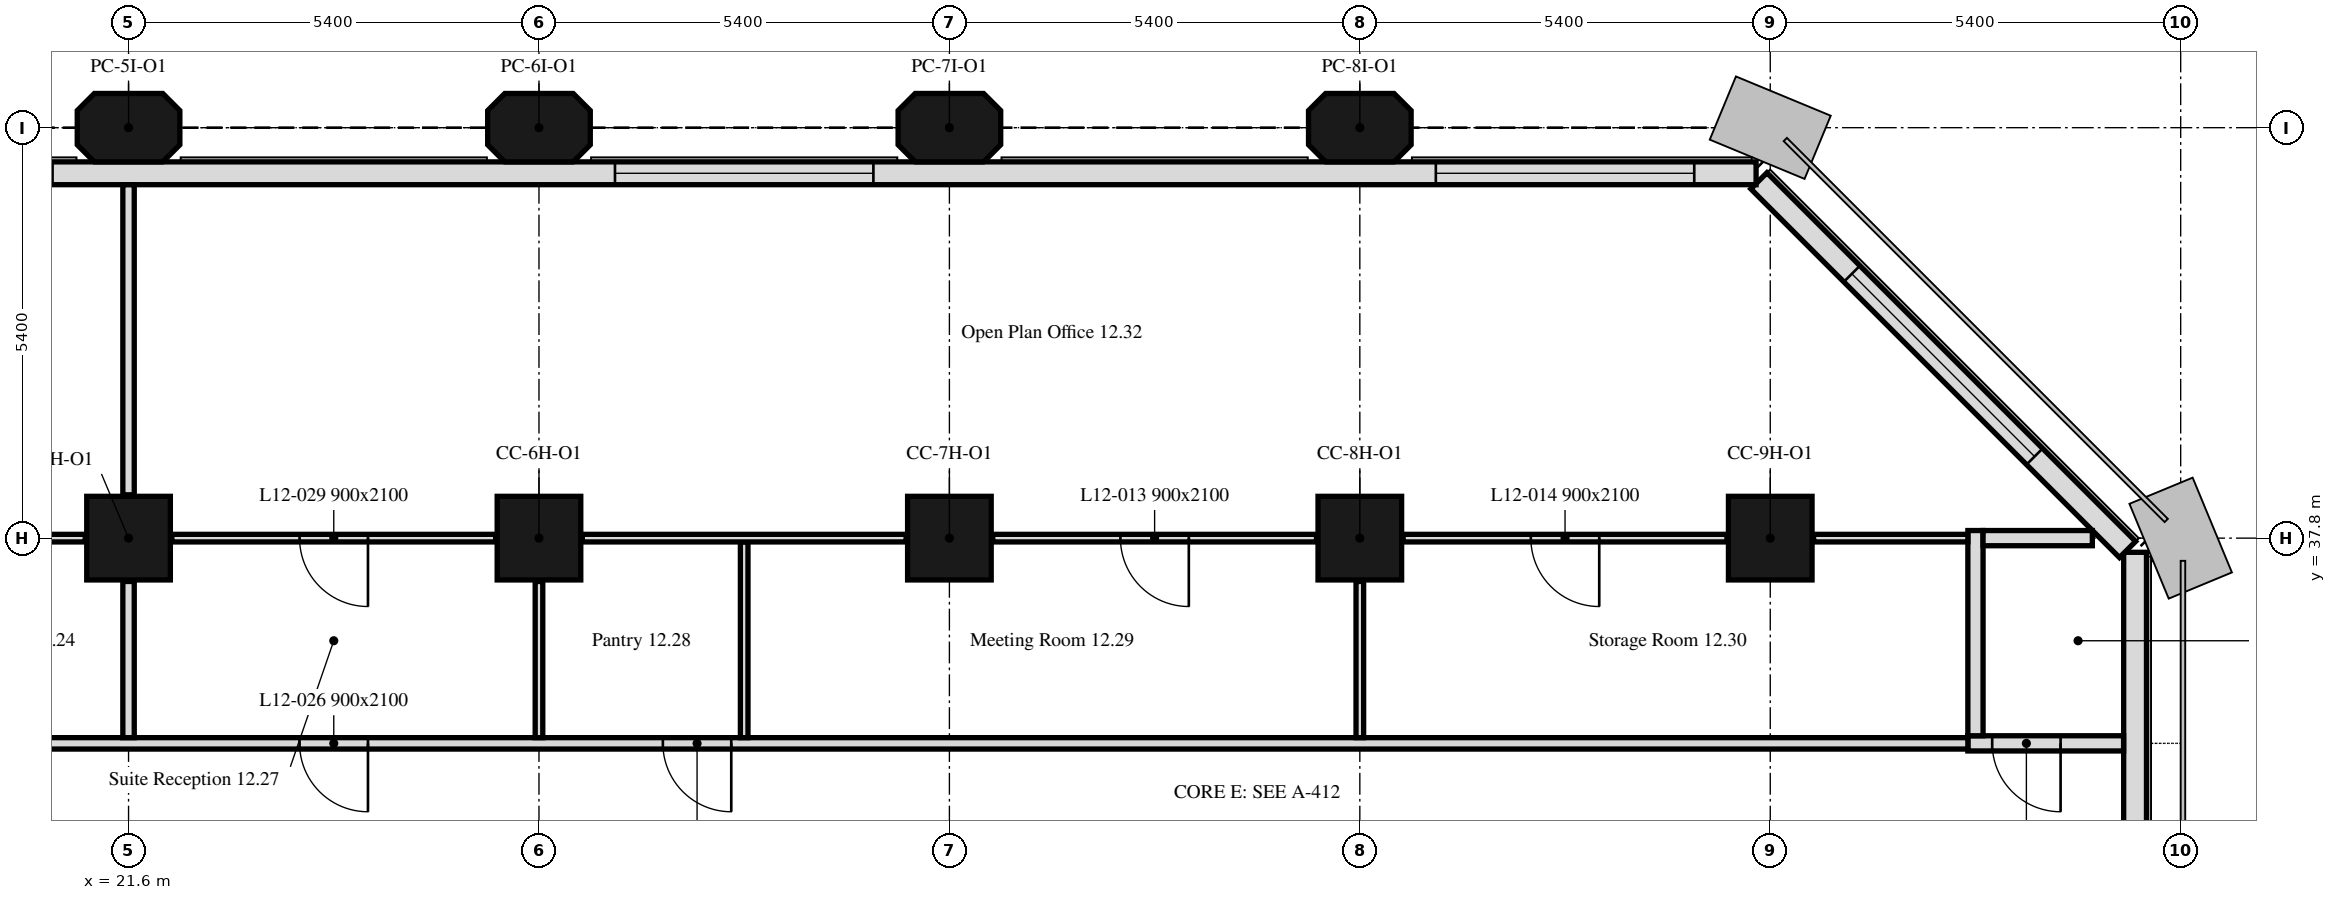
"""IFC4 building model, lengths in metres.
Left out: names, types, materials, properties, quantities, classifications, styles, units other than length and angle.
Written with IfcOpenShell. Run it as: python <this file> out.ifc"""

import sys

from ifc_helpers import new_model, si_unit, direction, frame, frame_2d, origin, origin_2d, place, context, subcontext, project, spatial, polyline, rectangle, outline, extrude, element, fill, save


model = new_model("IFC4")
c1 = context("Model", 3, precision=1e-05, world=origin(), true_north=direction((0.0, 1.0)))
c2 = subcontext(c1, "Body", "Model", "MODEL_VIEW")
j1 = project(units=[si_unit("LENGTHUNIT", "METRE"), si_unit("PLANEANGLEUNIT", "RADIAN")], contexts=[c1])
p1 = place(None, origin())
s1 = spatial("IfcSite", under=j1, at=p1, CompositionType="ELEMENT")
p2 = place(p1, origin())
s2 = spatial("IfcBuilding", under=s1, at=p2, CompositionType="ELEMENT")
p3 = place(p2, frame((0.0, 0.0, 56.4)))
s3 = spatial("IfcBuildingStorey", under=s2, at=p3, CompositionType="ELEMENT", Elevation=56.4)
for number, where, z_axis, x_axis in (
    (1, (21.6, 37.8, 0.0), (0.0, 0.0, 1.0), (1.0, 0.0, 0.0)),
    (2, (27.0, 37.8, 0.0), (0.0, 0.0, 1.0), (1.0, 0.0, 0.0)),
    (3, (32.4, 37.8, 0.0), (0.0, 0.0, 1.0), (1.0, 0.0, 0.0)),
    (4, (37.8, 37.8, 0.0), (0.0, 0.0, 1.0), (1.0, 0.0, 0.0)),
    (5, (43.2, 37.8, 0.0), (0.0, 0.0, 1.0), (1.0, 0.0, 0.0)),
):
    element("IfcColumn", number, at=place(p3, frame(where, z_axis=z_axis, x_axis=x_axis)), inside=s3, PredefinedType="COLUMN", context=c2, shape_type="SweptSolid", body=[
        extrude(rectangle(XDim=1.1, YDim=1.1, at=origin_2d()), origin(), (0.0, 0.0, 1.0), 3.3),
    ])
for number, where, z_axis, x_axis in (
    (6, (21.6, 43.2, 0.0), (0.0, 0.0, 1.0), (1.0, 0.0, 0.0)),
    (7, (27.0, 43.2, 0.0), (0.0, 0.0, 1.0), (1.0, 0.0, 0.0)),
    (8, (32.4, 43.2, 0.0), (0.0, 0.0, 1.0), (1.0, 0.0, 0.0)),
    (9, (37.8, 43.2, 0.0), (0.0, 0.0, 1.0), (1.0, 0.0, 0.0)),
):
    element("IfcColumn", number, at=place(p3, frame(where, z_axis=z_axis, x_axis=x_axis)), inside=s3, PredefinedType="COLUMN", context=c2, shape_type="SweptSolid", body=[
        extrude(outline(polyline([(-0.45, -0.45), (0.45, -0.45), (0.675, -0.225), (0.675, 0.225), (0.45, 0.45), (-0.45, 0.45), (-0.675, 0.225), (-0.675, -0.225), (-0.45, -0.45)])), origin(), (0.0, 0.0, 1.0), 3.3),
    ])
p4 = place(p3, frame((48.0, 5.586, 0.0), z_axis=(0.0, 0.0, 1.0), x_axis=(0.0, 1.0, 0.0)))
e10 = element("IfcWall", 10, at=p4, inside=s3, PredefinedType="SOLIDWALL", context=c2, shape_type="SweptSolid", body=[
    extrude(rectangle(XDim=32.027, YDim=0.3, at=frame_2d((16.014, 0.0))), origin(), (0.0, 0.0, 1.0), 3.3),
])
p5 = place(p4, frame((0.814, 0.0, 0.9)))
e11 = element("IfcOpeningElement", 11, at=p5, cuts=e10, PredefinedType="OPENING", context=c2, shape_type="SweptSolid", body=[
    extrude(rectangle(XDim=3.4, YDim=1.7, at=frame_2d((1.7, 0.85))), frame((0.0, 0.16, 0.0), z_axis=(0.0, -1.0, 0.0), x_axis=(1.0, 0.0, 0.0)), (0.0, 0.0, 1.0), 0.32),
])
p6 = place(p4, frame((11.614, 0.0, 0.9)))
e12 = element("IfcOpeningElement", 12, at=p6, cuts=e10, PredefinedType="OPENING", context=c2, shape_type="SweptSolid", body=[
    extrude(rectangle(XDim=3.4, YDim=1.7, at=frame_2d((1.7, 0.85))), frame((0.0, 0.16, 0.0), z_axis=(0.0, -1.0, 0.0), x_axis=(1.0, 0.0, 0.0)), (0.0, 0.0, 1.0), 0.32),
])
p7 = place(p4, frame((22.414, 0.0, 0.9)))
e13 = element("IfcOpeningElement", 13, at=p7, cuts=e10, PredefinedType="OPENING", context=c2, shape_type="SweptSolid", body=[
    extrude(rectangle(XDim=3.4, YDim=1.7, at=frame_2d((1.7, 0.85))), frame((0.0, 0.16, 0.0), z_axis=(0.0, -1.0, 0.0), x_axis=(1.0, 0.0, 0.0)), (0.0, 0.0, 1.0), 0.32),
])
p8 = place(p3, frame((47.901, 37.65, 0.0), z_axis=(0.0, 0.0, 1.0), x_axis=(-0.707106781187, 0.707106781187, 0.0)))
e14 = element("IfcWall", 14, at=p8, inside=s3, PredefinedType="SOLIDWALL", context=c2, shape_type="SweptSolid", body=[
    extrude(rectangle(XDim=6.86, YDim=0.3, at=frame_2d((3.43, 0.0))), origin(), (0.0, 0.0, 1.0), 3.3),
])
p9 = place(p8, frame((1.73, 0.0, 0.9)))
e15 = element("IfcOpeningElement", 15, at=p9, cuts=e14, PredefinedType="OPENING", context=c2, shape_type="SweptSolid", body=[
    extrude(rectangle(XDim=3.4, YDim=1.7, at=frame_2d((1.7, 0.85))), frame((0.0, 0.16, 0.0), z_axis=(0.0, -1.0, 0.0), x_axis=(1.0, 0.0, 0.0)), (0.0, 0.0, 1.0), 0.32),
])
p10 = place(p3, frame((43.014, 42.6, 0.0), z_axis=(0.0, 0.0, 1.0), x_axis=(-1.0, 0.0, 0.0)))
e16 = element("IfcWall", 16, at=p10, inside=s3, PredefinedType="SOLIDWALL", context=c2, shape_type="SweptSolid", body=[
    extrude(rectangle(XDim=32.027, YDim=0.3, at=frame_2d((16.014, 0.0))), origin(), (0.0, 0.0, 1.0), 3.3),
])
p11 = place(p10, frame((0.814, 0.0, 0.9)))
e17 = element("IfcOpeningElement", 17, at=p11, cuts=e16, PredefinedType="OPENING", context=c2, shape_type="SweptSolid", body=[
    extrude(rectangle(XDim=3.4, YDim=1.7, at=frame_2d((1.7, 0.85))), frame((0.0, 0.16, 0.0), z_axis=(0.0, -1.0, 0.0), x_axis=(1.0, 0.0, 0.0)), (0.0, 0.0, 1.0), 0.32),
])
p12 = place(p10, frame((11.614, 0.0, 0.9)))
e18 = element("IfcOpeningElement", 18, at=p12, cuts=e16, PredefinedType="OPENING", context=c2, shape_type="SweptSolid", body=[
    extrude(rectangle(XDim=3.4, YDim=1.7, at=frame_2d((1.7, 0.85))), frame((0.0, 0.16, 0.0), z_axis=(0.0, -1.0, 0.0), x_axis=(1.0, 0.0, 0.0)), (0.0, 0.0, 1.0), 0.32),
])
p13 = place(p10, frame((22.414, 0.0, 0.9)))
e19 = element("IfcOpeningElement", 19, at=p13, cuts=e16, PredefinedType="OPENING", context=c2, shape_type="SweptSolid", body=[
    extrude(rectangle(XDim=3.4, YDim=1.7, at=frame_2d((1.7, 0.85))), frame((0.0, 0.16, 0.0), z_axis=(0.0, -1.0, 0.0), x_axis=(1.0, 0.0, 0.0)), (0.0, 0.0, 1.0), 0.32),
])
p14 = place(p3, frame((47.849, 35.1, 0.0), z_axis=(0.0, 0.0, 1.0), x_axis=(-1.0, 0.0, 0.0)))
e20 = element("IfcWall", 20, at=p14, inside=s3, PredefinedType="PARTITIONING", context=c2, shape_type="SweptSolid", body=[
    extrude(rectangle(XDim=2.049, YDim=0.2, at=frame_2d((1.024, 0.0))), origin(), (0.0, 0.0, 1.0), 3.3),
])
p15 = place(p14, frame((0.829, 0.0, 0.0)))
e21 = element("IfcOpeningElement", 21, at=p15, cuts=e20, PredefinedType="OPENING", context=c2, shape_type="SweptSolid", body=[
    extrude(rectangle(XDim=0.9, YDim=2.1, at=frame_2d((0.45, 1.05))), frame((0.0, 0.1, 0.0), z_axis=(0.0, -1.0, 0.0), x_axis=(1.0, 0.0, 0.0)), (0.0, 0.0, 1.0), 0.2),
])
p16 = place(p3, frame((45.8, 35.1, 0.0), z_axis=(0.0, 0.0, 1.0), x_axis=(-1.0, 0.0, 0.0)))
e22 = element("IfcWall", 22, at=p16, inside=s3, PredefinedType="PARTITIONING", context=c2, shape_type="SweptSolid", body=[
    extrude(rectangle(XDim=39.649, YDim=0.15, at=frame_2d((19.825, 0.0))), origin(), (0.0, 0.0, 1.0), 3.3),
])
p17 = place(p16, frame((37.87, 0.0, 0.0)))
e23 = element("IfcOpeningElement", 23, at=p17, cuts=e22, PredefinedType="OPENING", context=c2, shape_type="SweptSolid", body=[
    extrude(rectangle(XDim=0.9, YDim=2.1, at=frame_2d((0.45, 1.05))), frame((0.0, 0.075, 0.0), z_axis=(0.0, -1.0, 0.0), x_axis=(1.0, 0.0, 0.0)), (0.0, 0.0, 1.0), 0.15),
])
p18 = place(p16, frame((36.575, 0.0, 0.0)))
e24 = element("IfcOpeningElement", 24, at=p18, cuts=e22, PredefinedType="OPENING", context=c2, shape_type="SweptSolid", body=[
    extrude(rectangle(XDim=0.9, YDim=2.1, at=frame_2d((0.45, 1.05))), frame((0.0, 0.075, 0.0), z_axis=(0.0, -1.0, 0.0), x_axis=(1.0, 0.0, 0.0)), (0.0, 0.0, 1.0), 0.15),
])
p19 = place(p16, frame((32.47, 0.0, 0.0)))
e25 = element("IfcOpeningElement", 25, at=p19, cuts=e22, PredefinedType="OPENING", context=c2, shape_type="SweptSolid", body=[
    extrude(rectangle(XDim=0.9, YDim=2.1, at=frame_2d((0.45, 1.05))), frame((0.0, 0.075, 0.0), z_axis=(0.0, -1.0, 0.0), x_axis=(1.0, 0.0, 0.0)), (0.0, 0.0, 1.0), 0.15),
])
p20 = place(p16, frame((16.27, 0.0, 0.0)))
e26 = element("IfcOpeningElement", 26, at=p20, cuts=e22, PredefinedType="OPENING", context=c2, shape_type="SweptSolid", body=[
    extrude(rectangle(XDim=0.9, YDim=2.1, at=frame_2d((0.45, 1.05))), frame((0.0, 0.075, 0.0), z_axis=(0.0, -1.0, 0.0), x_axis=(1.0, 0.0, 0.0)), (0.0, 0.0, 1.0), 0.15),
])
p21 = place(p16, frame((21.05, 0.0, 0.0)))
e27 = element("IfcOpeningElement", 27, at=p21, cuts=e22, PredefinedType="OPENING", context=c2, shape_type="SweptSolid", body=[
    extrude(rectangle(XDim=0.9, YDim=2.1, at=frame_2d((0.45, 1.05))), frame((0.0, 0.075, 0.0), z_axis=(0.0, -1.0, 0.0), x_axis=(1.0, 0.0, 0.0)), (0.0, 0.0, 1.0), 0.15),
])
p22 = place(p16, frame((31.23, 0.0, 0.0)))
e28 = element("IfcOpeningElement", 28, at=p22, cuts=e22, PredefinedType="OPENING", context=c2, shape_type="SweptSolid", body=[
    extrude(rectangle(XDim=0.9, YDim=2.1, at=frame_2d((0.45, 1.05))), frame((0.0, 0.075, 0.0), z_axis=(0.0, -1.0, 0.0), x_axis=(1.0, 0.0, 0.0)), (0.0, 0.0, 1.0), 0.15),
])
p23 = place(p3, frame((21.6, 35.175, 0.0), z_axis=(0.0, 0.0, 1.0), x_axis=(0.0, 1.0, 0.0)))
e29 = element("IfcWall", 29, at=p23, inside=s3, PredefinedType="PARTITIONING", context=c2, shape_type="SweptSolid", body=[
    extrude(rectangle(XDim=2.055, YDim=0.15, at=frame_2d((1.027, 0.0))), origin(), (0.0, 0.0, 1.0), 3.3),
])
p24 = place(p3, frame((21.03, 37.8, 0.0), z_axis=(0.0, 0.0, 1.0), x_axis=(-1.0, 0.0, 0.0)))
e30 = element("IfcWall", 30, at=p24, inside=s3, PredefinedType="PARTITIONING", context=c2, shape_type="SweptSolid", body=[
    extrude(rectangle(XDim=4.26, YDim=0.1, at=frame_2d((2.13, 0.0))), origin(), (0.0, 0.0, 1.0), 3.3),
])
p25 = place(p3, frame((21.6, 38.37, 0.0), z_axis=(0.0, 0.0, 1.0), x_axis=(0.0, 1.0, 0.0)))
e31 = element("IfcWall", 31, at=p25, inside=s3, PredefinedType="PARTITIONING", context=c2, shape_type="SweptSolid", body=[
    extrude(rectangle(XDim=4.079, YDim=0.15, at=frame_2d((2.04, 0.0))), origin(), (0.0, 0.0, 1.0), 3.3),
])
p26 = place(p3, frame((27.0, 35.175, 0.0), z_axis=(0.0, 0.0, 1.0), x_axis=(0.0, 1.0, 0.0)))
e32 = element("IfcWall", 32, at=p26, inside=s3, PredefinedType="PARTITIONING", context=c2, shape_type="SweptSolid", body=[
    extrude(rectangle(XDim=2.055, YDim=0.1, at=frame_2d((1.027, 0.0))), origin(), (0.0, 0.0, 1.0), 3.3),
])
p27 = place(p3, frame((26.43, 37.8, 0.0), z_axis=(0.0, 0.0, 1.0), x_axis=(-1.0, 0.0, 0.0)))
e33 = element("IfcWall", 33, at=p27, inside=s3, PredefinedType="PARTITIONING", context=c2, shape_type="SweptSolid", body=[
    extrude(rectangle(XDim=4.26, YDim=0.1, at=frame_2d((2.13, 0.0))), origin(), (0.0, 0.0, 1.0), 3.3),
])
p28 = place(p27, frame((1.68, 0.0, 0.0)))
e34 = element("IfcOpeningElement", 34, at=p28, cuts=e33, PredefinedType="OPENING", context=c2, shape_type="SweptSolid", body=[
    extrude(rectangle(XDim=0.9, YDim=2.1, at=frame_2d((0.45, 1.05))), frame((0.0, 0.05, 0.0), z_axis=(0.0, -1.0, 0.0), x_axis=(1.0, 0.0, 0.0)), (0.0, 0.0, 1.0), 0.1),
])
p29 = place(p3, frame((29.7, 35.175, 0.0), z_axis=(0.0, 0.0, 1.0), x_axis=(0.0, 1.0, 0.0)))
e35 = element("IfcWall", 35, at=p29, inside=s3, PredefinedType="PARTITIONING", context=c2, shape_type="SweptSolid", body=[
    extrude(rectangle(XDim=2.575, YDim=0.1, at=frame_2d((1.288, 0.0))), origin(), (0.0, 0.0, 1.0), 3.3),
])
p30 = place(p3, frame((37.8, 35.175, 0.0), z_axis=(0.0, 0.0, 1.0), x_axis=(0.0, 1.0, 0.0)))
e36 = element("IfcWall", 36, at=p30, inside=s3, PredefinedType="PARTITIONING", context=c2, shape_type="SweptSolid", body=[
    extrude(rectangle(XDim=2.055, YDim=0.1, at=frame_2d((1.027, 0.0))), origin(), (0.0, 0.0, 1.0), 3.3),
])
p31 = place(p3, frame((37.23, 37.8, 0.0), z_axis=(0.0, 0.0, 1.0), x_axis=(-1.0, 0.0, 0.0)))
e37 = element("IfcWall", 37, at=p31, inside=s3, PredefinedType="PARTITIONING", context=c2, shape_type="SweptSolid", body=[
    extrude(rectangle(XDim=4.26, YDim=0.1, at=frame_2d((2.13, 0.0))), origin(), (0.0, 0.0, 1.0), 3.3),
])
p32 = place(p31, frame((1.68, 0.0, 0.0)))
e38 = element("IfcOpeningElement", 38, at=p32, cuts=e37, PredefinedType="OPENING", context=c2, shape_type="SweptSolid", body=[
    extrude(rectangle(XDim=0.9, YDim=2.1, at=frame_2d((0.45, 1.05))), frame((0.0, 0.05, 0.0), z_axis=(0.0, -1.0, 0.0), x_axis=(1.0, 0.0, 0.0)), (0.0, 0.0, 1.0), 0.1),
])
p33 = place(p3, frame((31.83, 37.8, 0.0), z_axis=(0.0, 0.0, 1.0), x_axis=(-1.0, 0.0, 0.0)))
e39 = element("IfcWall", 39, at=p33, inside=s3, PredefinedType="PARTITIONING", context=c2, shape_type="SweptSolid", body=[
    extrude(rectangle(XDim=4.26, YDim=0.1, at=frame_2d((2.13, 0.0))), origin(), (0.0, 0.0, 1.0), 3.3),
])
p34 = place(p3, frame((45.9, 35.2, 0.0), z_axis=(0.0, 0.0, 1.0), x_axis=(0.0, 1.0, 0.0)))
e40 = element("IfcWall", 40, at=p34, inside=s3, PredefinedType="PARTITIONING", context=c2, shape_type="SweptSolid", body=[
    extrude(rectangle(XDim=2.7, YDim=0.2, at=frame_2d((1.35, 0.0))), origin(), (0.0, 0.0, 1.0), 3.3),
])
p35 = place(p3, frame((45.8, 37.8, 0.0), z_axis=(0.0, 0.0, 1.0), x_axis=(-1.0, 0.0, 0.0)))
e41 = element("IfcWall", 41, at=p35, inside=s3, PredefinedType="PARTITIONING", context=c2, shape_type="SweptSolid", body=[
    extrude(rectangle(XDim=2.03, YDim=0.1, at=frame_2d((1.015, 0.0))), origin(), (0.0, 0.0, 1.0), 3.3),
])
p36 = place(p3, frame((42.63, 37.8, 0.0), z_axis=(0.0, 0.0, 1.0), x_axis=(-1.0, 0.0, 0.0)))
e42 = element("IfcWall", 42, at=p36, inside=s3, PredefinedType="PARTITIONING", context=c2, shape_type="SweptSolid", body=[
    extrude(rectangle(XDim=4.26, YDim=0.1, at=frame_2d((2.13, 0.0))), origin(), (0.0, 0.0, 1.0), 3.3),
])
p37 = place(p36, frame((1.68, 0.0, 0.0)))
e43 = element("IfcOpeningElement", 43, at=p37, cuts=e42, PredefinedType="OPENING", context=c2, shape_type="SweptSolid", body=[
    extrude(rectangle(XDim=0.9, YDim=2.1, at=frame_2d((0.45, 1.05))), frame((0.0, 0.05, 0.0), z_axis=(0.0, -1.0, 0.0), x_axis=(1.0, 0.0, 0.0)), (0.0, 0.0, 1.0), 0.1),
])
p38 = place(p3, frame((47.438, 37.8, 0.0), z_axis=(0.0, 0.0, 1.0), x_axis=(-1.0, 0.0, 0.0)))
e44 = element("IfcWall", 44, at=p38, inside=s3, PredefinedType="PARTITIONING", context=c2, shape_type="SweptSolid", body=[
    extrude(rectangle(XDim=1.438, YDim=0.2, at=frame_2d((0.719, 0.0))), origin(), (0.0, 0.0, 1.0), 3.3),
])
p39 = place(p9, origin())
e45 = element("IfcWindow", 45, at=p39, inside=s3, PartitioningType="SINGLE_PANEL", PredefinedType="WINDOW", context=c2, shape_type="SweptSolid", body=[
    extrude(rectangle(XDim=3.4, YDim=1.7, at=frame_2d((1.7, 0.85))), frame((0.0, 0.03, 0.0), z_axis=(0.0, -1.0, 0.0), x_axis=(1.0, 0.0, 0.0)), (0.0, 0.0, 1.0), 0.06),
])
fill(e15, e45)
p40 = place(p11, origin())
e46 = element("IfcWindow", 46, at=p40, inside=s3, PartitioningType="SINGLE_PANEL", PredefinedType="WINDOW", context=c2, shape_type="SweptSolid", body=[
    extrude(rectangle(XDim=3.4, YDim=1.7, at=frame_2d((1.7, 0.85))), frame((0.0, 0.03, 0.0), z_axis=(0.0, -1.0, 0.0), x_axis=(1.0, 0.0, 0.0)), (0.0, 0.0, 1.0), 0.06),
])
fill(e17, e46)
p41 = place(p12, origin())
e47 = element("IfcWindow", 47, at=p41, inside=s3, PartitioningType="SINGLE_PANEL", PredefinedType="WINDOW", context=c2, shape_type="SweptSolid", body=[
    extrude(rectangle(XDim=3.4, YDim=1.7, at=frame_2d((1.7, 0.85))), frame((0.0, 0.03, 0.0), z_axis=(0.0, -1.0, 0.0), x_axis=(1.0, 0.0, 0.0)), (0.0, 0.0, 1.0), 0.06),
])
fill(e18, e47)
p42 = place(p20, origin())
e48 = element("IfcDoor", 48, at=p42, inside=s3, OperationType="SINGLE_SWING_LEFT", PredefinedType="DOOR", context=c2, shape_type="SweptSolid", body=[
    extrude(rectangle(XDim=0.9, YDim=2.1, at=frame_2d((0.45, 1.05))), frame((0.0, 0.025, 0.0), z_axis=(0.0, -1.0, 0.0), x_axis=(1.0, 0.0, 0.0)), (0.0, 0.0, 1.0), 0.05),
])
fill(e26, e48)
p43 = place(p15, origin())
e49 = element("IfcDoor", 49, at=p43, inside=s3, OperationType="SINGLE_SWING_RIGHT", PredefinedType="DOOR", context=c2, shape_type="SweptSolid", body=[
    extrude(rectangle(XDim=0.9, YDim=2.1, at=frame_2d((0.45, 1.05))), frame((0.0, 0.025, 0.0), z_axis=(0.0, -1.0, 0.0), x_axis=(1.0, 0.0, 0.0)), (0.0, 0.0, 1.0), 0.05),
])
fill(e21, e49)
p44 = place(p32, origin())
e50 = element("IfcDoor", 50, at=p44, inside=s3, OperationType="SINGLE_SWING_LEFT", PredefinedType="DOOR", context=c2, shape_type="SweptSolid", body=[
    extrude(rectangle(XDim=0.9, YDim=2.1, at=frame_2d((0.45, 1.05))), frame((0.0, 0.025, 0.0), z_axis=(0.0, -1.0, 0.0), x_axis=(1.0, 0.0, 0.0)), (0.0, 0.0, 1.0), 0.05),
])
fill(e38, e50)
p45 = place(p37, origin())
e51 = element("IfcDoor", 51, at=p45, inside=s3, OperationType="SINGLE_SWING_RIGHT", PredefinedType="DOOR", context=c2, shape_type="SweptSolid", body=[
    extrude(rectangle(XDim=0.9, YDim=2.1, at=frame_2d((0.45, 1.05))), frame((0.0, 0.025, 0.0), z_axis=(0.0, -1.0, 0.0), x_axis=(1.0, 0.0, 0.0)), (0.0, 0.0, 1.0), 0.05),
])
fill(e43, e51)
p46 = place(p21, origin())
e52 = element("IfcDoor", 52, at=p46, inside=s3, OperationType="SINGLE_SWING_LEFT", PredefinedType="DOOR", context=c2, shape_type="SweptSolid", body=[
    extrude(rectangle(XDim=0.9, YDim=2.1, at=frame_2d((0.45, 1.05))), frame((0.0, 0.025, 0.0), z_axis=(0.0, -1.0, 0.0), x_axis=(1.0, 0.0, 0.0)), (0.0, 0.0, 1.0), 0.05),
])
fill(e27, e52)
p47 = place(p28, origin())
e53 = element("IfcDoor", 53, at=p47, inside=s3, OperationType="SINGLE_SWING_RIGHT", PredefinedType="DOOR", context=c2, shape_type="SweptSolid", body=[
    extrude(rectangle(XDim=0.9, YDim=2.1, at=frame_2d((0.45, 1.05))), frame((0.0, 0.025, 0.0), z_axis=(0.0, -1.0, 0.0), x_axis=(1.0, 0.0, 0.0)), (0.0, 0.0, 1.0), 0.05),
])
fill(e34, e53)
save(model, sys.argv[1])
